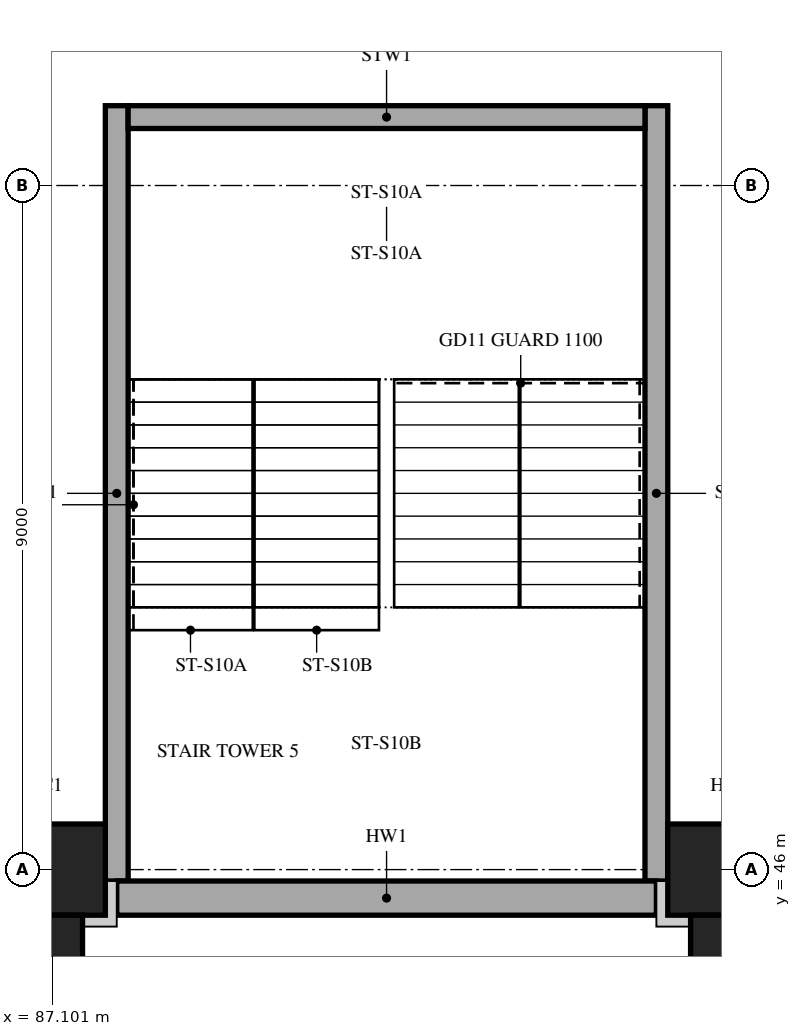
"""IFC4 building model, lengths in metres.
Left out: names, types, materials, properties, quantities, classifications, styles, units other than length and angle.
Written with IfcOpenShell. Run it as: python <this file> out.ifc"""

import sys

from ifc_helpers import new_model, si_unit, direction, frame, frame_2d, origin, origin_2d, place, context, subcontext, project, spatial, rectangle, extrude, element, save


model = new_model("IFC4")
c1 = context("Model", 3, precision=1e-05, world=origin(), true_north=direction((0.0, 1.0)))
c2 = subcontext(c1, "Body", "Model", "MODEL_VIEW")
j1 = project(units=[si_unit("LENGTHUNIT", "METRE"), si_unit("PLANEANGLEUNIT", "RADIAN")], contexts=[c1])
p1 = place(None, origin())
s1 = spatial("IfcSite", under=j1, at=p1, CompositionType="ELEMENT")
p2 = place(p1, origin())
s2 = spatial("IfcBuilding", under=s1, at=p2, CompositionType="ELEMENT")
p3 = place(p2, frame((0.0, 0.0, 10.0)))
s3 = spatial("IfcBuildingStorey", under=s2, at=p3, CompositionType="ELEMENT", Elevation=10.0)
for number, where, z_axis, x_axis in (
    (1, (87.0, 46.0, 0.0), (0.0, 0.0, 1.0), (1.0, 0.0, 0.0)),
    (2, (96.0, 46.0, 0.0), (0.0, 0.0, 1.0), (1.0, 0.0, 0.0)),
):
    element("IfcColumn", number, at=place(p3, frame(where, z_axis=z_axis, x_axis=x_axis)), inside=s3, PredefinedType="COLUMN", context=c2, shape_type="SweptSolid", body=[
        extrude(rectangle(XDim=1.6, YDim=1.2, at=origin_2d()), origin(), (0.0, 0.0, 1.0), 5.0),
    ])
for number, where, z_axis, x_axis in (
    (3, (87.95, 45.85, 0.0), (0.0, 0.0, 1.0), (0.0, 1.0, 0.0)),
    (4, (95.05, 45.85, 0.0), (0.0, 0.0, 1.0), (0.0, 1.0, 0.0)),
):
    element("IfcWall", number, at=place(p3, frame(where, z_axis=z_axis, x_axis=x_axis)), inside=s3, PredefinedType="SHEAR", context=c2, shape_type="SweptSolid", body=[
        extrude(rectangle(XDim=10.2, YDim=0.3, at=frame_2d((5.1, 0.0))), origin(), (0.0, 0.0, 1.0), 5.0),
    ])
p4 = place(p3, frame((88.1, 55.9, 0.0), z_axis=(0.0, 0.0, 1.0), x_axis=(1.0, 0.0, 0.0)))
e5 = element("IfcWall", 5, at=p4, inside=s3, PredefinedType="SHEAR", context=c2, shape_type="SweptSolid", body=[
    extrude(rectangle(XDim=6.8, YDim=0.3, at=frame_2d((3.4, 0.0))), origin(), (0.0, 0.0, 1.0), 5.0),
])
for number, where, z_axis, x_axis in (
    (6, (87.0, 44.9, 0.0), (0.0, 0.0, 1.0), (1.0, 0.0, 0.0)),
    (7, (96.0, 44.9, 0.0), (0.0, 0.0, 1.0), (1.0, 0.0, 0.0)),
):
    element("IfcColumn", number, at=place(p3, frame(where, z_axis=z_axis, x_axis=x_axis)), inside=s3, PredefinedType="COLUMN", context=c2, shape_type="SweptSolid", body=[
        extrude(rectangle(XDim=1.0, YDim=1.0, at=origin_2d()), origin(), (0.0, 0.0, 1.0), 3.4),
    ])
p5 = place(p3, frame((87.95, 45.625, 0.0), z_axis=(0.0, 0.0, 1.0), x_axis=(1.0, 0.0, 0.0)))
e8 = element("IfcWall", 8, at=p5, inside=s3, PredefinedType="SOLIDWALL", context=c2, shape_type="SweptSolid", body=[
    extrude(rectangle(XDim=7.1, YDim=0.45, at=frame_2d((3.55, 0.0))), origin(), (0.0, 0.0, 1.0), 5.0),
])
save(model, sys.argv[1])
